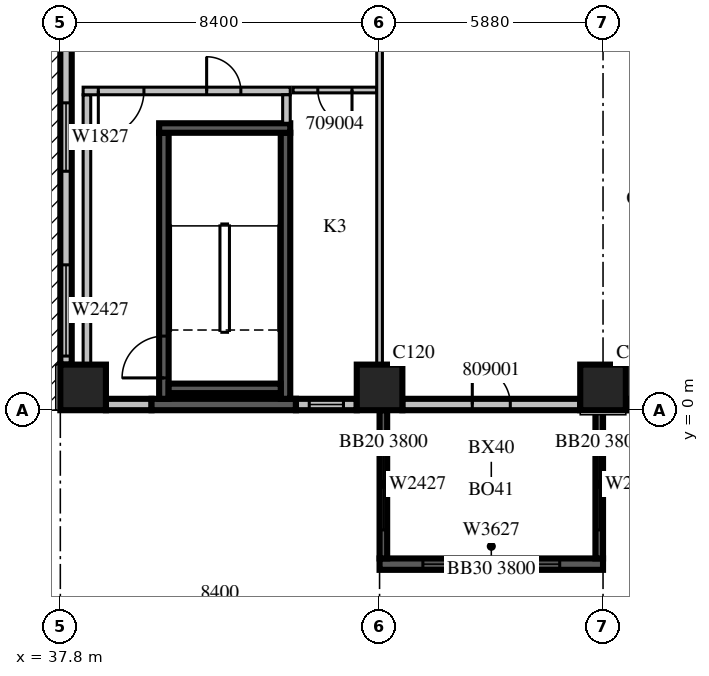
"""IFC4 building model, lengths in metres.
Left out: names, types, materials, properties, quantities, classifications, styles, units other than length and angle.
Written with IfcOpenShell. Run it as: python <this file> out.ifc"""

import sys

from ifc_helpers import new_model, si_unit, direction, frame, frame_2d, origin, origin_2d, place, context, subcontext, project, spatial, rectangle, extrude, source, transform, mapped, element, fill, save


model = new_model("IFC4")
c1 = context("Model", 3, precision=1e-05, world=origin(), true_north=direction((0.0, 1.0)))
c2 = subcontext(c1, "Body", "Model", "MODEL_VIEW")
j1 = project(units=[si_unit("LENGTHUNIT", "METRE"), si_unit("PLANEANGLEUNIT", "RADIAN")], contexts=[c1])
p1 = place(None, origin())
s1 = spatial("IfcSite", under=j1, at=p1, CompositionType="ELEMENT")
p2 = place(p1, origin())
s2 = spatial("IfcBuilding", under=s1, at=p2, CompositionType="ELEMENT")
p3 = place(p2, frame((0.0, 0.0, 48.9)))
s3 = spatial("IfcBuildingStorey", under=s2, at=p3, CompositionType="ELEMENT", Elevation=48.9)
m1 = source(origin(), c2, "Body", "SweptSolid", [
    extrude(rectangle(XDim=1.2, YDim=1.2, at=origin_2d()), origin(), (0.0, 0.0, 1.0), 4.2),
])
for number, where, z_axis, x_axis in (
    (1, (38.4, 0.6, 0.0), (0.0, 0.0, 1.0), (1.0, 0.0, 0.0)),
    (2, (46.2, 0.6, 0.0), (0.0, 0.0, 1.0), (1.0, 0.0, 0.0)),
    (3, (52.08, 0.6, 0.0), (0.0, 0.0, 1.0), (1.0, 0.0, 0.0)),
):
    element("IfcColumn", number, at=place(p3, frame(where, z_axis=z_axis, x_axis=x_axis)), inside=s3, PredefinedType="COLUMN", context=c2, shape_type="MappedRepresentation", body=[
        mapped(m1, transform((0.0, 0.0, 0.0), scale=1.0)),
    ])
p4 = place(p3, frame((46.2, -4.05, 0.0), z_axis=(0.0, 0.0, 1.0), x_axis=(1.0, 0.0, 0.0)))
e4 = element("IfcWall", 4, at=p4, inside=s3, PredefinedType="SOLIDWALL", context=c2, shape_type="SweptSolid", body=[
    extrude(rectangle(XDim=5.88, YDim=0.3, at=frame_2d((2.94, 0.0))), origin(), (0.0, 0.0, 1.0), 3.8),
])
m2 = source(origin(), c2, "Body", "SweptSolid", [
    extrude(rectangle(XDim=3.6, YDim=2.7, at=frame_2d((1.8, 1.35))), frame((0.0, 0.16, 0.0), z_axis=(0.0, -1.0, 0.0), x_axis=(1.0, 0.0, 0.0)), (0.0, 0.0, 1.0), 0.32),
])
p5 = place(p4, frame((1.14, 0.0, 0.6)))
e5 = element("IfcOpeningElement", 5, at=p5, cuts=e4, PredefinedType="OPENING", context=c2, shape_type="MappedRepresentation", body=[
    mapped(m2, transform((0.0, 0.0, 0.0), scale=1.0)),
])
p6 = place(p3, frame((46.3, 0.0, 0.0), z_axis=(0.0, 0.0, 1.0), x_axis=(0.0, -1.0, 0.0)))
e6 = element("IfcWall", 6, at=p6, inside=s3, PredefinedType="SOLIDWALL", context=c2, shape_type="SweptSolid", body=[
    extrude(rectangle(XDim=3.9, YDim=0.2, at=frame_2d((1.95, 0.0))), origin(), (0.0, 0.0, 1.0), 3.8),
])
m3 = source(origin(), c2, "Body", "SweptSolid", [
    extrude(rectangle(XDim=2.4, YDim=2.7, at=frame_2d((1.2, 1.35))), frame((0.0, 0.11, 0.0), z_axis=(0.0, -1.0, 0.0), x_axis=(1.0, 0.0, 0.0)), (0.0, 0.0, 1.0), 0.22),
])
p7 = place(p6, frame((0.75, 0.0, 0.6)))
e7 = element("IfcOpeningElement", 7, at=p7, cuts=e6, PredefinedType="OPENING", context=c2, shape_type="MappedRepresentation", body=[
    mapped(m3, transform((0.0, 0.0, 0.0), scale=1.0)),
])
m4 = source(origin(), c2, "Body", "SweptSolid", [
    extrude(rectangle(XDim=3.9, YDim=0.2, at=frame_2d((1.95, 0.0))), origin(), (0.0, 0.0, 1.0), 3.8),
])
p8 = place(p3, frame((51.98, 0.0, 0.0), z_axis=(0.0, 0.0, 1.0), x_axis=(0.0, -1.0, 0.0)))
e8 = element("IfcWall", 8, at=p8, inside=s3, PredefinedType="SOLIDWALL", context=c2, shape_type="MappedRepresentation", body=[
    mapped(m4, transform((0.0, 0.0, 0.0), scale=1.0)),
])
p9 = place(p8, frame((0.75, 0.0, 0.6)))
e9 = element("IfcOpeningElement", 9, at=p9, cuts=e8, PredefinedType="OPENING", context=c2, shape_type="MappedRepresentation", body=[
    mapped(m3, transform((0.0, 0.0, 0.0), scale=1.0)),
])
m5 = source(origin(), c2, "Body", "SweptSolid", [
    extrude(rectangle(XDim=8.7, YDim=0.3, at=frame_2d((4.35, 0.0))), origin(), (0.0, 0.0, 1.0), 3.8),
])
p10 = place(p3, frame((37.95, 9.9, 0.0), z_axis=(0.0, 0.0, 1.0), x_axis=(0.0, -1.0, 0.0)))
e10 = element("IfcWall", 10, at=p10, inside=s3, PredefinedType="STANDARD", context=c2, shape_type="MappedRepresentation", body=[
    mapped(m5, transform((0.0, 0.0, 0.0), scale=1.0)),
])
m6 = source(origin(), c2, "Body", "SweptSolid", [
    extrude(rectangle(XDim=1.8, YDim=2.7, at=frame_2d((0.9, 1.35))), frame((0.0, 0.16, 0.0), z_axis=(0.0, -1.0, 0.0), x_axis=(1.0, 0.0, 0.0)), (0.0, 0.0, 1.0), 0.32),
])
p11 = place(p10, frame((1.812, 0.0, 0.6)))
e11 = element("IfcOpeningElement", 11, at=p11, cuts=e10, PredefinedType="OPENING", context=c2, shape_type="MappedRepresentation", body=[
    mapped(m6, transform((0.0, 0.0, 0.0), scale=1.0)),
])
m7 = source(origin(), c2, "Body", "SweptSolid", [
    extrude(rectangle(XDim=2.4, YDim=2.7, at=frame_2d((1.2, 1.35))), frame((0.0, 0.16, 0.0), z_axis=(0.0, -1.0, 0.0), x_axis=(1.0, 0.0, 0.0)), (0.0, 0.0, 1.0), 0.32),
])
p12 = place(p10, frame((6.075, 0.0, 0.6)))
e12 = element("IfcOpeningElement", 12, at=p12, cuts=e10, PredefinedType="OPENING", context=c2, shape_type="MappedRepresentation", body=[
    mapped(m7, transform((0.0, 0.0, 0.0), scale=1.0)),
])
m8 = source(origin(), c2, "Body", "SweptSolid", [
    extrude(rectangle(XDim=1.2, YDim=0.3, at=frame_2d((0.6, 0.0))), origin(), (0.0, 0.0, 1.0), 3.8),
])
p13 = place(p3, frame((39.0, 0.15, 0.0), z_axis=(0.0, 0.0, 1.0), x_axis=(1.0, 0.0, 0.0)))
e13 = element("IfcWall", 13, at=p13, inside=s3, PredefinedType="STANDARD", context=c2, shape_type="MappedRepresentation", body=[
    mapped(m8, transform((0.0, 0.0, 0.0), scale=1.0)),
])
m9 = source(origin(), c2, "Body", "SweptSolid", [
    extrude(rectangle(XDim=3.8, YDim=0.3, at=frame_2d((1.9, 0.0))), origin(), (0.0, 0.0, 1.0), 3.8),
])
p14 = place(p3, frame((40.2, 0.15, 0.0), z_axis=(0.0, 0.0, 1.0), x_axis=(1.0, 0.0, 0.0)))
e14 = element("IfcWall", 14, at=p14, inside=s3, PredefinedType="SOLIDWALL", context=c2, shape_type="MappedRepresentation", body=[
    mapped(m9, transform((0.0, 0.0, 0.0), scale=1.0)),
])
m10 = source(origin(), c2, "Body", "SweptSolid", [
    extrude(rectangle(XDim=1.6, YDim=0.3, at=frame_2d((0.8, 0.0))), origin(), (0.0, 0.0, 1.0), 3.8),
])
p15 = place(p3, frame((44.0, 0.15, 0.0), z_axis=(0.0, 0.0, 1.0), x_axis=(1.0, 0.0, 0.0)))
e15 = element("IfcWall", 15, at=p15, inside=s3, PredefinedType="STANDARD", context=c2, shape_type="MappedRepresentation", body=[
    mapped(m10, transform((0.0, 0.0, 0.0), scale=1.0)),
])
m11 = source(origin(), c2, "Body", "SweptSolid", [
    extrude(rectangle(XDim=0.9, YDim=2.7, at=frame_2d((0.45, 1.35))), frame((0.0, 0.16, 0.0), z_axis=(0.0, -1.0, 0.0), x_axis=(1.0, 0.0, 0.0)), (0.0, 0.0, 1.0), 0.32),
])
p16 = place(p15, frame((0.35, 0.0, 0.6)))
e16 = element("IfcOpeningElement", 16, at=p16, cuts=e15, PredefinedType="OPENING", context=c2, shape_type="MappedRepresentation", body=[
    mapped(m11, transform((0.0, 0.0, 0.0), scale=1.0)),
])
m12 = source(origin(), c2, "Body", "SweptSolid", [
    extrude(rectangle(XDim=4.68, YDim=0.3, at=frame_2d((2.34, 0.0))), origin(), (0.0, 0.0, 1.0), 3.8),
])
p17 = place(p3, frame((46.8, 0.15, 0.0), z_axis=(0.0, 0.0, 1.0), x_axis=(1.0, 0.0, 0.0)))
e17 = element("IfcWall", 17, at=p17, inside=s3, PredefinedType="STANDARD", context=c2, shape_type="MappedRepresentation", body=[
    mapped(m12, transform((0.0, 0.0, 0.0), scale=1.0)),
])
m13 = source(origin(), c2, "Body", "SweptSolid", [
    extrude(rectangle(XDim=1.0, YDim=2.1, at=frame_2d((0.5, 1.05))), frame((0.0, 0.16, 0.0), z_axis=(0.0, -1.0, 0.0), x_axis=(1.0, 0.0, 0.0)), (0.0, 0.0, 1.0), 0.32),
])
p18 = place(p17, frame((1.84, 0.0, 0.0)))
e18 = element("IfcOpeningElement", 18, at=p18, cuts=e17, PredefinedType="OPENING", context=c2, shape_type="MappedRepresentation", body=[
    mapped(m13, transform((0.0, 0.0, 0.0), scale=1.0)),
])
p19 = place(p3, frame((52.68, 0.15, 0.0), z_axis=(0.0, 0.0, 1.0), x_axis=(1.0, 0.0, 0.0)))
e19 = element("IfcWall", 19, at=p19, inside=s3, PredefinedType="STANDARD", context=c2, shape_type="MappedRepresentation", body=[
    mapped(m12, transform((0.0, 0.0, 0.0), scale=1.0)),
])
p20 = place(p19, frame((0.54, 0.0, 0.6)))
e20 = element("IfcOpeningElement", 20, at=p20, cuts=e19, PredefinedType="OPENING", context=c2, shape_type="MappedRepresentation", body=[
    mapped(m2, transform((0.0, 0.0, 0.0), scale=1.0)),
])
m14 = source(origin(), c2, "Body", "SweptSolid", [
    extrude(rectangle(XDim=7.0, YDim=0.25, at=frame_2d((3.5, 0.0))), origin(), (0.0, 0.0, 1.0), 3.8),
])
p21 = place(p3, frame((40.525, 0.3, 0.0), z_axis=(0.0, 0.0, 1.0), x_axis=(0.0, 1.0, 0.0)))
e21 = element("IfcWall", 21, at=p21, inside=s3, PredefinedType="SOLIDWALL", context=c2, shape_type="MappedRepresentation", body=[
    mapped(m14, transform((0.0, 0.0, 0.0), scale=1.0)),
])
m15 = source(origin(), c2, "Body", "SweptSolid", [
    extrude(rectangle(XDim=1.1, YDim=2.1, at=frame_2d((0.55, 1.05))), frame((0.0, 0.135, 0.0), z_axis=(0.0, -1.0, 0.0), x_axis=(1.0, 0.0, 0.0)), (0.0, 0.0, 1.0), 0.27),
])
p22 = place(p21, frame((0.55, 0.0, 0.0)))
e22 = element("IfcOpeningElement", 22, at=p22, cuts=e21, PredefinedType="OPENING", context=c2, shape_type="MappedRepresentation", body=[
    mapped(m15, transform((0.0, 0.0, 0.0), scale=1.0)),
])
p23 = place(p3, frame((43.725, 0.3, 0.0), z_axis=(0.0, 0.0, 1.0), x_axis=(0.0, 1.0, 0.0)))
e23 = element("IfcWall", 23, at=p23, inside=s3, PredefinedType="SOLIDWALL", context=c2, shape_type="MappedRepresentation", body=[
    mapped(m14, transform((0.0, 0.0, 0.0), scale=1.0)),
])
m16 = source(origin(), c2, "Body", "SweptSolid", [
    extrude(rectangle(XDim=3.45, YDim=0.25, at=frame_2d((1.725, 0.0))), origin(), (0.0, 0.0, 1.0), 3.8),
])
p24 = place(p3, frame((40.4, 7.425, 0.0), z_axis=(0.0, 0.0, 1.0), x_axis=(1.0, 0.0, 0.0)))
e24 = element("IfcWall", 24, at=p24, inside=s3, PredefinedType="SOLIDWALL", context=c2, shape_type="MappedRepresentation", body=[
    mapped(m16, transform((0.0, 0.0, 0.0), scale=1.0)),
])
m17 = source(origin(), c2, "Body", "SweptSolid", [
    extrude(rectangle(XDim=2.95, YDim=0.25, at=frame_2d((1.475, 0.0))), origin(), (0.0, 0.0, 1.0), 3.8),
])
p25 = place(p3, frame((40.65, 0.575, 0.0), z_axis=(0.0, 0.0, 1.0), x_axis=(1.0, 0.0, 0.0)))
e25 = element("IfcWall", 25, at=p25, inside=s3, PredefinedType="SOLIDWALL", context=c2, shape_type="MappedRepresentation", body=[
    mapped(m17, transform((0.0, 0.0, 0.0), scale=1.0)),
])
m18 = source(origin(), c2, "Body", "SweptSolid", [
    extrude(rectangle(XDim=8.0, YDim=0.2, at=frame_2d((4.0, 0.0))), origin(), (0.0, 0.0, 1.0), 3.8),
])
p26 = place(p3, frame((38.5, 0.3, 0.0), z_axis=(0.0, 0.0, 1.0), x_axis=(0.0, 1.0, 0.0)))
e26 = element("IfcWall", 26, at=p26, inside=s3, PredefinedType="PARTITIONING", context=c2, shape_type="MappedRepresentation", body=[
    mapped(m18, transform((0.0, 0.0, 0.0), scale=1.0)),
])
m19 = source(origin(), c2, "Body", "SweptSolid", [
    extrude(rectangle(XDim=5.45, YDim=0.2, at=frame_2d((2.725, 0.0))), origin(), (0.0, 0.0, 1.0), 3.8),
])
p27 = place(p3, frame((38.4, 8.4, 0.0), z_axis=(0.0, 0.0, 1.0), x_axis=(1.0, 0.0, 0.0)))
e27 = element("IfcWall", 27, at=p27, inside=s3, PredefinedType="PARTITIONING", context=c2, shape_type="MappedRepresentation", body=[
    mapped(m19, transform((0.0, 0.0, 0.0), scale=1.0)),
])
m20 = source(origin(), c2, "Body", "SweptSolid", [
    extrude(rectangle(XDim=1.2, YDim=2.1, at=frame_2d((0.6, 1.05))), frame((0.0, 0.11, 0.0), z_axis=(0.0, -1.0, 0.0), x_axis=(1.0, 0.0, 0.0)), (0.0, 0.0, 1.0), 0.22),
])
p28 = place(p27, frame((0.4, 0.0, 0.0)))
e28 = element("IfcOpeningElement", 28, at=p28, cuts=e27, PredefinedType="OPENING", context=c2, shape_type="MappedRepresentation", body=[
    mapped(m20, transform((0.0, 0.0, 0.0), scale=1.0)),
])
m21 = source(origin(), c2, "Body", "SweptSolid", [
    extrude(rectangle(XDim=0.9, YDim=2.1, at=frame_2d((0.45, 1.05))), frame((0.0, 0.11, 0.0), z_axis=(0.0, -1.0, 0.0), x_axis=(1.0, 0.0, 0.0)), (0.0, 0.0, 1.0), 0.22),
])
p29 = place(p27, frame((3.25, 0.0, 0.0)))
e29 = element("IfcOpeningElement", 29, at=p29, cuts=e27, PredefinedType="OPENING", context=c2, shape_type="MappedRepresentation", body=[
    mapped(m21, transform((0.0, 0.0, 0.0), scale=1.0)),
])
m22 = source(origin(), c2, "Body", "SweptSolid", [
    extrude(rectangle(XDim=0.75, YDim=0.2, at=frame_2d((0.375, 0.0))), origin(), (0.0, 0.0, 1.0), 3.8),
])
p30 = place(p3, frame((43.75, 7.55, 0.0), z_axis=(0.0, 0.0, 1.0), x_axis=(0.0, 1.0, 0.0)))
e30 = element("IfcWall", 30, at=p30, inside=s3, PredefinedType="PARTITIONING", context=c2, shape_type="MappedRepresentation", body=[
    mapped(m22, transform((0.0, 0.0, 0.0), scale=1.0)),
])
m23 = source(origin(), c2, "Body", "SweptSolid", [
    extrude(rectangle(XDim=2.2, YDim=0.15, at=frame_2d((1.1, 0.0))), origin(), (0.0, 0.0, 1.0), 3.8),
])
p31 = place(p3, frame((46.125, 8.425, 0.0), z_axis=(0.0, 0.0, 1.0), x_axis=(-1.0, 0.0, 0.0)))
e31 = element("IfcWall", 31, at=p31, inside=s3, PredefinedType="PARTITIONING", context=c2, shape_type="MappedRepresentation", body=[
    mapped(m23, transform((0.0, 0.0, 0.0), scale=1.0)),
])
m24 = source(origin(), c2, "Body", "SweptSolid", [
    extrude(rectangle(XDim=0.9, YDim=2.1, at=frame_2d((0.45, 1.05))), frame((0.0, 0.085, 0.0), z_axis=(0.0, -1.0, 0.0), x_axis=(1.0, 0.0, 0.0)), (0.0, 0.0, 1.0), 0.17),
])
p32 = place(p31, frame((0.65, 0.0, 0.0)))
e32 = element("IfcOpeningElement", 32, at=p32, cuts=e31, PredefinedType="OPENING", context=c2, shape_type="MappedRepresentation", body=[
    mapped(m24, transform((0.0, 0.0, 0.0), scale=1.0)),
])
m25 = source(origin(), c2, "Body", "SweptSolid", [
    extrude(rectangle(XDim=8.702, YDim=0.15, at=frame_2d((4.351, 0.0))), origin(), (0.0, 0.0, 1.0), 3.8),
])
p33 = place(p3, frame((46.2, 1.199, 0.0), z_axis=(0.0, 0.0, 1.0), x_axis=(0.0, 1.0, 0.0)))
e33 = element("IfcWall", 33, at=p33, inside=s3, PredefinedType="PARTITIONING", context=c2, shape_type="MappedRepresentation", body=[
    mapped(m25, transform((0.0, 0.0, 0.0), scale=1.0)),
])
m26 = source(origin(), c2, "Body", "SweptSolid", [
    extrude(rectangle(XDim=3.6, YDim=2.7, at=frame_2d((1.8, 1.35))), frame((0.0, 0.03, 0.0), z_axis=(0.0, -1.0, 0.0), x_axis=(1.0, 0.0, 0.0)), (0.0, 0.0, 1.0), 0.06),
])
p34 = place(p5, origin())
e34 = element("IfcWindow", 34, at=p34, inside=s3, PartitioningType="SINGLE_PANEL", PredefinedType="WINDOW", context=c2, shape_type="MappedRepresentation", body=[
    mapped(m26, transform((0.0, 0.0, 0.0), scale=1.0)),
])
fill(e5, e34)
m27 = source(origin(), c2, "Body", "SweptSolid", [
    extrude(rectangle(XDim=2.4, YDim=2.7, at=frame_2d((1.2, 1.35))), frame((0.0, 0.03, 0.0), z_axis=(0.0, -1.0, 0.0), x_axis=(1.0, 0.0, 0.0)), (0.0, 0.0, 1.0), 0.06),
])
p35 = place(p7, origin())
e35 = element("IfcWindow", 35, at=p35, inside=s3, PartitioningType="SINGLE_PANEL", PredefinedType="WINDOW", context=c2, shape_type="MappedRepresentation", body=[
    mapped(m27, transform((0.0, 0.0, 0.0), scale=1.0)),
])
fill(e7, e35)
p36 = place(p9, origin())
e36 = element("IfcWindow", 36, at=p36, inside=s3, PartitioningType="SINGLE_PANEL", PredefinedType="WINDOW", context=c2, shape_type="MappedRepresentation", body=[
    mapped(m27, transform((0.0, 0.0, 0.0), scale=1.0)),
])
fill(e9, e36)
m28 = source(origin(), c2, "Body", "SweptSolid", [
    extrude(rectangle(XDim=1.8, YDim=2.7, at=frame_2d((0.9, 1.35))), frame((0.0, 0.03, 0.0), z_axis=(0.0, -1.0, 0.0), x_axis=(1.0, 0.0, 0.0)), (0.0, 0.0, 1.0), 0.06),
])
p37 = place(p11, origin())
e37 = element("IfcWindow", 37, at=p37, inside=s3, PartitioningType="SINGLE_PANEL", PredefinedType="WINDOW", context=c2, shape_type="MappedRepresentation", body=[
    mapped(m28, transform((0.0, 0.0, 0.0), scale=1.0)),
])
fill(e11, e37)
p38 = place(p12, origin())
e38 = element("IfcWindow", 38, at=p38, inside=s3, PartitioningType="SINGLE_PANEL", PredefinedType="WINDOW", context=c2, shape_type="MappedRepresentation", body=[
    mapped(m27, transform((0.0, 0.0, 0.0), scale=1.0)),
])
fill(e12, e38)
m29 = source(origin(), c2, "Body", "SweptSolid", [
    extrude(rectangle(XDim=0.9, YDim=2.7, at=frame_2d((0.45, 1.35))), frame((0.0, 0.03, 0.0), z_axis=(0.0, -1.0, 0.0), x_axis=(1.0, 0.0, 0.0)), (0.0, 0.0, 1.0), 0.06),
])
p39 = place(p16, origin())
e39 = element("IfcWindow", 39, at=p39, inside=s3, PartitioningType="SINGLE_PANEL", PredefinedType="WINDOW", context=c2, shape_type="MappedRepresentation", body=[
    mapped(m29, transform((0.0, 0.0, 0.0), scale=1.0)),
])
fill(e16, e39)
m30 = source(origin(), c2, "Body", "SweptSolid", [
    extrude(rectangle(XDim=1.1, YDim=2.1, at=frame_2d((0.55, 1.05))), frame((0.0, 0.025, 0.0), z_axis=(0.0, -1.0, 0.0), x_axis=(1.0, 0.0, 0.0)), (0.0, 0.0, 1.0), 0.05),
])
p40 = place(p22, origin())
e40 = element("IfcDoor", 40, at=p40, inside=s3, OperationType="SINGLE_SWING_LEFT", PredefinedType="DOOR", context=c2, shape_type="MappedRepresentation", body=[
    mapped(m30, transform((0.0, 0.0, 0.0), scale=1.0)),
])
fill(e22, e40)
m31 = source(origin(), c2, "Body", "SweptSolid", [
    extrude(rectangle(XDim=1.2, YDim=2.1, at=frame_2d((0.6, 1.05))), frame((0.0, 0.025, 0.0), z_axis=(0.0, -1.0, 0.0), x_axis=(1.0, 0.0, 0.0)), (0.0, 0.0, 1.0), 0.05),
])
p41 = place(p28, origin())
e41 = element("IfcDoor", 41, at=p41, inside=s3, OperationType="SINGLE_SWING_RIGHT", PredefinedType="DOOR", context=c2, shape_type="MappedRepresentation", body=[
    mapped(m31, transform((0.0, 0.0, 0.0), scale=1.0)),
])
fill(e28, e41)
m32 = source(origin(), c2, "Body", "SweptSolid", [
    extrude(rectangle(XDim=0.9, YDim=2.1, at=frame_2d((0.45, 1.05))), frame((0.0, 0.025, 0.0), z_axis=(0.0, -1.0, 0.0), x_axis=(1.0, 0.0, 0.0)), (0.0, 0.0, 1.0), 0.05),
])
p42 = place(p29, origin())
e42 = element("IfcDoor", 42, at=p42, inside=s3, OperationType="SINGLE_SWING_LEFT", PredefinedType="DOOR", context=c2, shape_type="MappedRepresentation", body=[
    mapped(m32, transform((0.0, 0.0, 0.0), scale=1.0)),
])
fill(e29, e42)
p43 = place(p32, origin())
e43 = element("IfcDoor", 43, at=p43, inside=s3, OperationType="SINGLE_SWING_LEFT", PredefinedType="DOOR", context=c2, shape_type="MappedRepresentation", body=[
    mapped(m32, transform((0.0, 0.0, 0.0), scale=1.0)),
])
fill(e32, e43)
m33 = source(origin(), c2, "Body", "SweptSolid", [
    extrude(rectangle(XDim=1.0, YDim=2.1, at=frame_2d((0.5, 1.05))), frame((0.0, 0.025, 0.0), z_axis=(0.0, -1.0, 0.0), x_axis=(1.0, 0.0, 0.0)), (0.0, 0.0, 1.0), 0.05),
])
p44 = place(p18, origin())
e44 = element("IfcDoor", 44, at=p44, inside=s3, OperationType="SINGLE_SWING_LEFT", PredefinedType="DOOR", context=c2, shape_type="MappedRepresentation", body=[
    mapped(m33, transform((0.0, 0.0, 0.0), scale=1.0)),
])
fill(e18, e44)
save(model, sys.argv[1])
